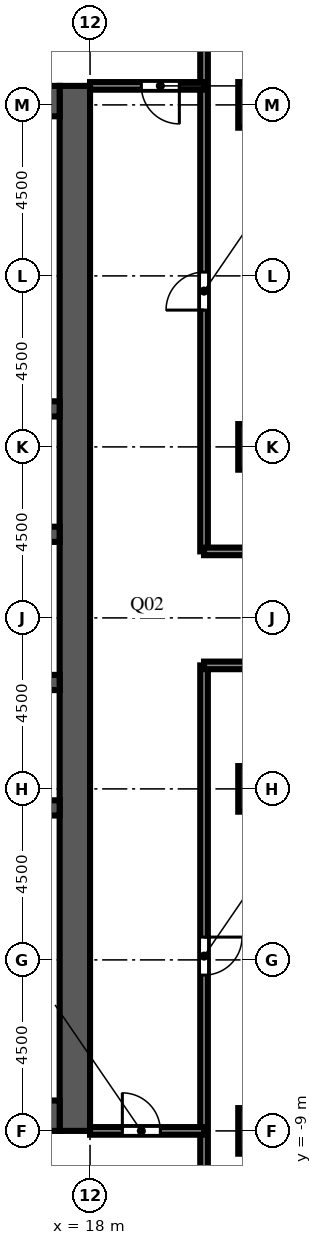
"""IFC4 building model, lengths in metres.
Left out: names, types, materials, properties, quantities, classifications, styles, units other than length and angle.
Written with IfcOpenShell. Run it as: python <this file> out.ifc"""

import sys

from ifc_helpers import new_model, si_unit, direction, frame, frame_2d, origin, origin_2d, place, context, subcontext, project, spatial, rectangle, extrude, element, fill, save


model = new_model("IFC4")
c1 = context("Model", 3, precision=1e-05, world=origin(), true_north=direction((0.0, 1.0)))
c2 = subcontext(c1, "Body", "Model", "MODEL_VIEW")
j1 = project(units=[si_unit("LENGTHUNIT", "METRE"), si_unit("PLANEANGLEUNIT", "RADIAN")], contexts=[c1])
p1 = place(None, origin())
s1 = spatial("IfcSite", under=j1, at=p1, CompositionType="ELEMENT")
p2 = place(p1, origin())
s2 = spatial("IfcBuilding", under=s1, at=p2, CompositionType="ELEMENT")
p3 = place(p2, frame((0.0, 0.0, 220.2)))
s3 = spatial("IfcBuildingStorey", under=s2, at=p3, CompositionType="ELEMENT", Elevation=220.2)
for number, where, z_axis, x_axis in (
    (1, (22.5, -9.0, 0.0), (0.0, 0.0, 1.0), (1.0, 0.0, 0.0)),
    (2, (22.5, 0.0, 0.0), (0.0, 0.0, 1.0), (1.0, 0.0, 0.0)),
    (3, (22.5, 9.0, 0.0), (0.0, 0.0, 1.0), (1.0, 0.0, 0.0)),
    (4, (22.5, 18.0, 0.0), (0.0, 0.0, 1.0), (1.0, 0.0, 0.0)),
):
    element("IfcColumn", number, at=place(p3, frame(where, z_axis=z_axis, x_axis=x_axis)), inside=s3, PredefinedType="COLUMN", context=c2, shape_type="SweptSolid", body=[
        extrude(rectangle(XDim=1.2, YDim=1.2, at=origin_2d()), origin(), (0.0, 0.0, 1.0), 6.0),
    ])
p4 = place(p3, frame((17.6, -9.0, 0.0), z_axis=(0.0, 0.0, 1.0), x_axis=(0.0, 1.0, 0.0)))
e5 = element("IfcWall", 5, at=p4, inside=s3, PredefinedType="SHEAR", context=c2, shape_type="SweptSolid", body=[
    extrude(rectangle(XDim=27.5, YDim=0.8, at=frame_2d((13.75, 0.0))), origin(), (0.0, 0.0, 1.0), 6.0),
])
p5 = place(p4, frame((12.55, 0.0, 0.0)))
e6 = element("IfcOpeningElement", 6, at=p5, cuts=e5, PredefinedType="OPENING", context=c2, shape_type="SweptSolid", body=[
    extrude(rectangle(XDim=2.4, YDim=2.4, at=frame_2d((1.2, 1.2))), frame((0.0, 0.41, 0.0), z_axis=(0.0, -1.0, 0.0), x_axis=(1.0, 0.0, 0.0)), (0.0, 0.0, 1.0), 0.82),
])
p6 = place(p4, frame((6.825, 0.0, 0.0)))
e7 = element("IfcOpeningElement", 7, at=p6, cuts=e5, PredefinedType="OPENING", context=c2, shape_type="SweptSolid", body=[
    extrude(rectangle(XDim=1.2, YDim=2.1, at=frame_2d((0.6, 1.05))), frame((0.0, 0.41, 0.0), z_axis=(0.0, -1.0, 0.0), x_axis=(1.0, 0.0, 0.0)), (0.0, 0.0, 1.0), 0.82),
])
p7 = place(p4, frame((19.475, 0.0, 0.0)))
e8 = element("IfcOpeningElement", 8, at=p7, cuts=e5, PredefinedType="OPENING", context=c2, shape_type="SweptSolid", body=[
    extrude(rectangle(XDim=1.2, YDim=2.1, at=frame_2d((0.6, 1.05))), frame((0.0, 0.41, 0.0), z_axis=(0.0, -1.0, 0.0), x_axis=(1.0, 0.0, 0.0)), (0.0, 0.0, 1.0), 0.82),
])
for number, where, z_axis, x_axis in (
    (9, (6.8, -8.6, 0.0), (0.0, 0.0, 1.0), (1.0, 0.0, 0.0)),
    (10, (6.8, 18.1, 0.0), (0.0, 0.0, 1.0), (1.0, 0.0, 0.0)),
):
    element("IfcWall", number, at=place(p3, frame(where, z_axis=z_axis, x_axis=x_axis)), inside=s3, PredefinedType="SHEAR", context=c2, shape_type="SweptSolid", body=[
        extrude(rectangle(XDim=10.4, YDim=0.8, at=frame_2d((5.2, 0.0))), origin(), (0.0, 0.0, 1.0), 6.0),
    ])
p8 = place(p3, frame((6.8, -0.5, 0.0), z_axis=(0.0, 0.0, 1.0), x_axis=(1.0, 0.0, 0.0)))
e11 = element("IfcWall", 11, at=p8, inside=s3, PredefinedType="SHEAR", context=c2, shape_type="SweptSolid", body=[
    extrude(rectangle(XDim=10.4, YDim=0.4, at=frame_2d((5.2, 0.0))), origin(), (0.0, 0.0, 1.0), 6.0),
])
p9 = place(p3, frame((6.8, 2.8, 0.0), z_axis=(0.0, 0.0, 1.0), x_axis=(1.0, 0.0, 0.0)))
e12 = element("IfcWall", 12, at=p9, inside=s3, PredefinedType="SHEAR", context=c2, shape_type="SweptSolid", body=[
    extrude(rectangle(XDim=10.4, YDim=0.4, at=frame_2d((5.2, 0.0))), origin(), (0.0, 0.0, 1.0), 6.0),
])
p10 = place(p9, frame((0.738, 0.0, 0.0)))
e13 = element("IfcOpeningElement", 13, at=p10, cuts=e12, PredefinedType="OPENING", context=c2, shape_type="SweptSolid", body=[
    extrude(rectangle(XDim=1.1, YDim=2.1, at=frame_2d((0.55, 1.05))), frame((0.0, 0.21, 0.0), z_axis=(0.0, -1.0, 0.0), x_axis=(1.0, 0.0, 0.0)), (0.0, 0.0, 1.0), 0.42),
])
p11 = place(p9, frame((3.337, 0.0, 0.0)))
e14 = element("IfcOpeningElement", 14, at=p11, cuts=e12, PredefinedType="OPENING", context=c2, shape_type="SweptSolid", body=[
    extrude(rectangle(XDim=1.1, YDim=2.1, at=frame_2d((0.55, 1.05))), frame((0.0, 0.21, 0.0), z_axis=(0.0, -1.0, 0.0), x_axis=(1.0, 0.0, 0.0)), (0.0, 0.0, 1.0), 0.42),
])
p12 = place(p9, frame((6.012, 0.0, 0.0)))
e15 = element("IfcOpeningElement", 15, at=p12, cuts=e12, PredefinedType="OPENING", context=c2, shape_type="SweptSolid", body=[
    extrude(rectangle(XDim=1.0, YDim=2.1, at=frame_2d((0.5, 1.05))), frame((0.0, 0.21, 0.0), z_axis=(0.0, -1.0, 0.0), x_axis=(1.0, 0.0, 0.0)), (0.0, 0.0, 1.0), 0.42),
])
p13 = place(p9, frame((8.613, 0.0, 0.0)))
e16 = element("IfcOpeningElement", 16, at=p13, cuts=e12, PredefinedType="OPENING", context=c2, shape_type="SweptSolid", body=[
    extrude(rectangle(XDim=1.0, YDim=2.1, at=frame_2d((0.5, 1.05))), frame((0.0, 0.21, 0.0), z_axis=(0.0, -1.0, 0.0), x_axis=(1.0, 0.0, 0.0)), (0.0, 0.0, 1.0), 0.42),
])
p14 = place(p3, frame((6.8, 6.7, 0.0), z_axis=(0.0, 0.0, 1.0), x_axis=(1.0, 0.0, 0.0)))
e17 = element("IfcWall", 17, at=p14, inside=s3, PredefinedType="SHEAR", context=c2, shape_type="SweptSolid", body=[
    extrude(rectangle(XDim=10.4, YDim=0.4, at=frame_2d((5.2, 0.0))), origin(), (0.0, 0.0, 1.0), 6.0),
])
p15 = place(p14, frame((3.337, 0.0, 0.0)))
e18 = element("IfcOpeningElement", 18, at=p15, cuts=e17, PredefinedType="OPENING", context=c2, shape_type="SweptSolid", body=[
    extrude(rectangle(XDim=1.1, YDim=2.1, at=frame_2d((0.55, 1.05))), frame((0.0, 0.21, 0.0), z_axis=(0.0, -1.0, 0.0), x_axis=(1.0, 0.0, 0.0)), (0.0, 0.0, 1.0), 0.42),
])
p16 = place(p14, frame((5.962, 0.0, 0.0)))
e19 = element("IfcOpeningElement", 19, at=p16, cuts=e17, PredefinedType="OPENING", context=c2, shape_type="SweptSolid", body=[
    extrude(rectangle(XDim=1.1, YDim=2.1, at=frame_2d((0.55, 1.05))), frame((0.0, 0.21, 0.0), z_axis=(0.0, -1.0, 0.0), x_axis=(1.0, 0.0, 0.0)), (0.0, 0.0, 1.0), 0.42),
])
p17 = place(p14, frame((8.663, 0.0, 0.0)))
e20 = element("IfcOpeningElement", 20, at=p17, cuts=e17, PredefinedType="OPENING", context=c2, shape_type="SweptSolid", body=[
    extrude(rectangle(XDim=1.1, YDim=2.1, at=frame_2d((0.55, 1.05))), frame((0.0, 0.21, 0.0), z_axis=(0.0, -1.0, 0.0), x_axis=(1.0, 0.0, 0.0)), (0.0, 0.0, 1.0), 0.42),
])
p18 = place(p14, frame((0.688, 0.0, 0.0)))
e21 = element("IfcOpeningElement", 21, at=p18, cuts=e17, PredefinedType="OPENING", context=c2, shape_type="SweptSolid", body=[
    extrude(rectangle(XDim=1.0, YDim=2.1, at=frame_2d((0.5, 1.05))), frame((0.0, 0.21, 0.0), z_axis=(0.0, -1.0, 0.0), x_axis=(1.0, 0.0, 0.0)), (0.0, 0.0, 1.0), 0.42),
])
p19 = place(p3, frame((6.8, 10.0, 0.0), z_axis=(0.0, 0.0, 1.0), x_axis=(1.0, 0.0, 0.0)))
e22 = element("IfcWall", 22, at=p19, inside=s3, PredefinedType="SHEAR", context=c2, shape_type="SweptSolid", body=[
    extrude(rectangle(XDim=10.4, YDim=0.4, at=frame_2d((5.2, 0.0))), origin(), (0.0, 0.0, 1.0), 6.0),
])
p20 = place(p3, frame((21.0, 3.25, 0.0), z_axis=(0.0, 0.0, 1.0), x_axis=(0.0, -1.0, 0.0)))
e23 = element("IfcWall", 23, at=p20, inside=s3, PredefinedType="PARTITIONING", context=c2, shape_type="SweptSolid", body=[
    extrude(rectangle(XDim=25.3, YDim=0.2, at=frame_2d((12.65, 0.0))), origin(), (0.0, 0.0, 1.0), 5.4),
])
p21 = place(p20, frame((7.15, 0.0, 0.0)))
e24 = element("IfcOpeningElement", 24, at=p21, cuts=e23, PredefinedType="OPENING", context=c2, shape_type="SweptSolid", body=[
    extrude(rectangle(XDim=1.0, YDim=2.1, at=frame_2d((0.5, 1.05))), frame((0.0, 0.11, 0.0), z_axis=(0.0, -1.0, 0.0), x_axis=(1.0, 0.0, 0.0)), (0.0, 0.0, 1.0), 0.22),
])
p22 = place(p3, frame((21.0, 26.85, 0.0), z_axis=(0.0, 0.0, 1.0), x_axis=(0.0, -1.0, 0.0)))
e25 = element("IfcWall", 25, at=p22, inside=s3, PredefinedType="PARTITIONING", context=c2, shape_type="SweptSolid", body=[
    extrude(rectangle(XDim=20.6, YDim=0.2, at=frame_2d((10.3, 0.0))), origin(), (0.0, 0.0, 1.0), 5.4),
])
p23 = place(p22, frame((13.25, 0.0, 0.0)))
e26 = element("IfcOpeningElement", 26, at=p23, cuts=e25, PredefinedType="OPENING", context=c2, shape_type="SweptSolid", body=[
    extrude(rectangle(XDim=1.0, YDim=2.1, at=frame_2d((0.5, 1.05))), frame((0.0, 0.11, 0.0), z_axis=(0.0, -1.0, 0.0), x_axis=(1.0, 0.0, 0.0)), (0.0, 0.0, 1.0), 0.22),
])
p24 = place(p3, frame((21.0, -9.0, 0.0), z_axis=(0.0, 0.0, 1.0), x_axis=(-1.0, 0.0, 0.0)))
e27 = element("IfcWall", 27, at=p24, inside=s3, PredefinedType="PARTITIONING", context=c2, shape_type="SweptSolid", body=[
    extrude(rectangle(XDim=3.0, YDim=0.2, at=frame_2d((1.5, 0.0))), origin(), (0.0, 0.0, 1.0), 5.4),
])
p25 = place(p24, frame((1.15, 0.0, 0.0)))
e28 = element("IfcOpeningElement", 28, at=p25, cuts=e27, PredefinedType="OPENING", context=c2, shape_type="SweptSolid", body=[
    extrude(rectangle(XDim=1.0, YDim=2.1, at=frame_2d((0.5, 1.05))), frame((0.0, 0.11, 0.0), z_axis=(0.0, -1.0, 0.0), x_axis=(1.0, 0.0, 0.0)), (0.0, 0.0, 1.0), 0.22),
])
for number, where, z_axis, x_axis in (
    (29, (21.0, 3.25, 0.0), (0.0, 0.0, 1.0), (1.0, 0.0, 0.0)),
    (30, (21.0, 6.25, 0.0), (0.0, 0.0, 1.0), (1.0, 0.0, 0.0)),
):
    element("IfcWall", number, at=place(p3, frame(where, z_axis=z_axis, x_axis=x_axis)), inside=s3, PredefinedType="PARTITIONING", context=c2, shape_type="SweptSolid", body=[
        extrude(rectangle(XDim=5.55, YDim=0.2, at=frame_2d((2.775, 0.0))), origin(), (0.0, 0.0, 1.0), 5.4),
    ])
p26 = place(p3, frame((18.0, 18.5, 0.0), z_axis=(0.0, 0.0, 1.0), x_axis=(1.0, 0.0, 0.0)))
e31 = element("IfcWall", 31, at=p26, inside=s3, PredefinedType="PARTITIONING", context=c2, shape_type="SweptSolid", body=[
    extrude(rectangle(XDim=3.0, YDim=0.2, at=frame_2d((1.5, 0.0))), origin(), (0.0, 0.0, 1.0), 5.4),
])
p27 = place(p26, frame((1.35, 0.0, 0.0)))
e32 = element("IfcOpeningElement", 32, at=p27, cuts=e31, PredefinedType="OPENING", context=c2, shape_type="SweptSolid", body=[
    extrude(rectangle(XDim=1.0, YDim=2.1, at=frame_2d((0.5, 1.05))), frame((0.0, 0.11, 0.0), z_axis=(0.0, -1.0, 0.0), x_axis=(1.0, 0.0, 0.0)), (0.0, 0.0, 1.0), 0.22),
])
p28 = place(p5, origin())
e33 = element("IfcDoor", 33, at=p28, inside=s3, OperationType="DOUBLE_DOOR_DOUBLE_SWING", PredefinedType="DOOR", context=c2, shape_type="SweptSolid", body=[
    extrude(rectangle(XDim=2.4, YDim=2.4, at=frame_2d((1.2, 1.2))), frame((0.0, 0.025, 0.0), z_axis=(0.0, -1.0, 0.0), x_axis=(1.0, 0.0, 0.0)), (0.0, 0.0, 1.0), 0.05),
])
fill(e6, e33)
p29 = place(p6, frame((1.2, 0.0, 0.0), z_axis=(0.0, 0.0, 1.0), x_axis=(-1.0, 0.0, 0.0)))
e34 = element("IfcDoor", 34, at=p29, inside=s3, OperationType="SINGLE_SWING_LEFT", PredefinedType="DOOR", context=c2, shape_type="SweptSolid", body=[
    extrude(rectangle(XDim=1.2, YDim=2.1, at=frame_2d((0.6, 1.05))), frame((0.0, 0.025, 0.0), z_axis=(0.0, -1.0, 0.0), x_axis=(1.0, 0.0, 0.0)), (0.0, 0.0, 1.0), 0.05),
])
fill(e7, e34)
p30 = place(p7, frame((1.2, 0.0, 0.0), z_axis=(0.0, 0.0, 1.0), x_axis=(-1.0, 0.0, 0.0)))
e35 = element("IfcDoor", 35, at=p30, inside=s3, OperationType="SINGLE_SWING_LEFT", PredefinedType="DOOR", context=c2, shape_type="SweptSolid", body=[
    extrude(rectangle(XDim=1.2, YDim=2.1, at=frame_2d((0.6, 1.05))), frame((0.0, 0.025, 0.0), z_axis=(0.0, -1.0, 0.0), x_axis=(1.0, 0.0, 0.0)), (0.0, 0.0, 1.0), 0.05),
])
fill(e8, e35)
p31 = place(p25, origin())
e36 = element("IfcDoor", 36, at=p31, inside=s3, OperationType="SINGLE_SWING_RIGHT", PredefinedType="DOOR", context=c2, shape_type="SweptSolid", body=[
    extrude(rectangle(XDim=1.0, YDim=2.1, at=frame_2d((0.5, 1.05))), frame((0.0, 0.025, 0.0), z_axis=(0.0, -1.0, 0.0), x_axis=(1.0, 0.0, 0.0)), (0.0, 0.0, 1.0), 0.05),
])
fill(e28, e36)
p32 = place(p27, origin())
e37 = element("IfcDoor", 37, at=p32, inside=s3, OperationType="SINGLE_SWING_RIGHT", PredefinedType="DOOR", context=c2, shape_type="SweptSolid", body=[
    extrude(rectangle(XDim=1.0, YDim=2.1, at=frame_2d((0.5, 1.05))), frame((0.0, 0.025, 0.0), z_axis=(0.0, -1.0, 0.0), x_axis=(1.0, 0.0, 0.0)), (0.0, 0.0, 1.0), 0.05),
])
fill(e32, e37)
p33 = place(p21, origin())
e38 = element("IfcDoor", 38, at=p33, inside=s3, OperationType="SINGLE_SWING_LEFT", PredefinedType="DOOR", context=c2, shape_type="SweptSolid", body=[
    extrude(rectangle(XDim=1.0, YDim=2.1, at=frame_2d((0.5, 1.05))), frame((0.0, 0.025, 0.0), z_axis=(0.0, -1.0, 0.0), x_axis=(1.0, 0.0, 0.0)), (0.0, 0.0, 1.0), 0.05),
])
fill(e24, e38)
p34 = place(p23, origin())
e39 = element("IfcDoor", 39, at=p34, inside=s3, OperationType="SINGLE_SWING_RIGHT", PredefinedType="DOOR", context=c2, shape_type="SweptSolid", body=[
    extrude(rectangle(XDim=1.0, YDim=2.1, at=frame_2d((0.5, 1.05))), frame((0.0, 0.025, 0.0), z_axis=(0.0, -1.0, 0.0), x_axis=(1.0, 0.0, 0.0)), (0.0, 0.0, 1.0), 0.05),
])
fill(e26, e39)
save(model, sys.argv[1])
